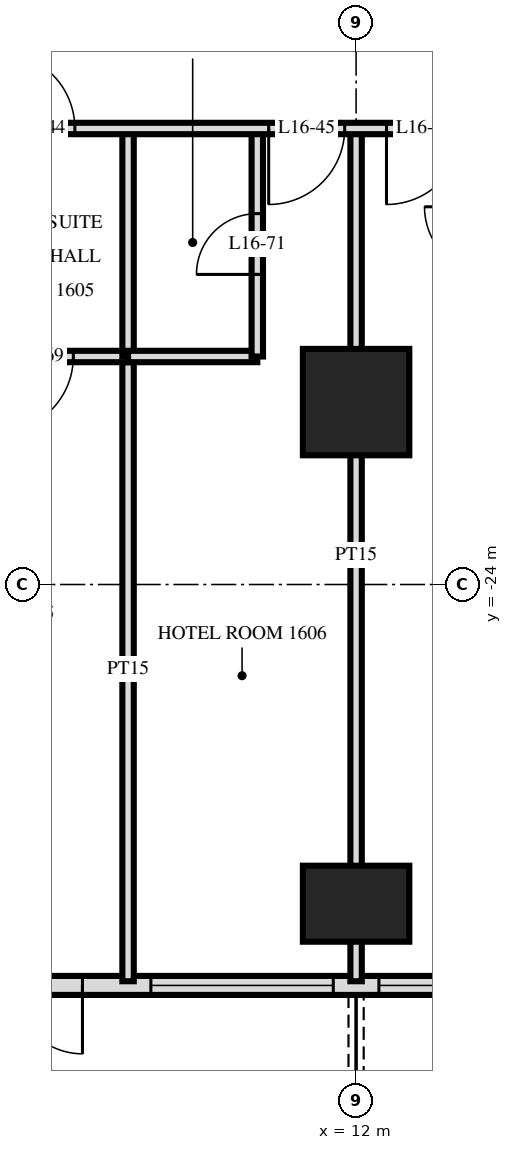
"""IFC4 building model, lengths in metres.
Left out: names, types, materials, properties, quantities, classifications, styles, units other than length and angle.
Written with IfcOpenShell. Run it as: python <this file> out.ifc"""

import sys

from ifc_helpers import new_model, si_unit, direction, frame, frame_2d, origin, origin_2d, place, context, subcontext, project, spatial, rectangle, extrude, element, fill, save


model = new_model("IFC4")
c1 = context("Model", 3, precision=1e-05, world=origin(), true_north=direction((0.0, 1.0)))
c2 = subcontext(c1, "Body", "Model", "MODEL_VIEW")
j1 = project(units=[si_unit("LENGTHUNIT", "METRE"), si_unit("PLANEANGLEUNIT", "RADIAN")], contexts=[c1])
p1 = place(None, origin())
s1 = spatial("IfcSite", under=j1, at=p1, CompositionType="ELEMENT")
p2 = place(p1, origin())
s2 = spatial("IfcBuilding", under=s1, at=p2, CompositionType="ELEMENT")
p3 = place(p2, frame((0.0, 0.0, 67.2)))
s3 = spatial("IfcBuildingStorey", under=s2, at=p3, CompositionType="ELEMENT", Elevation=67.2)
p4 = place(p3, frame((12.0, -28.2, 0.0), z_axis=(0.0, 0.0, 1.0), x_axis=(1.0, 0.0, 0.0)))
e1 = element("IfcColumn", 1, at=p4, inside=s3, PredefinedType="COLUMN", context=c2, shape_type="SweptSolid", body=[
    extrude(rectangle(XDim=1.4, YDim=1.0, at=origin_2d()), origin(), (0.0, 0.0, 1.0), 3.6),
])
p5 = place(p3, frame((12.0, -21.6, 0.0), z_axis=(0.0, 0.0, 1.0), x_axis=(1.0, 0.0, 0.0)))
e2 = element("IfcColumn", 2, at=p5, inside=s3, PredefinedType="COLUMN", context=c2, shape_type="SweptSolid", body=[
    extrude(rectangle(XDim=1.4, YDim=1.4, at=origin_2d()), origin(), (0.0, 0.0, 1.0), 3.6),
])
p6 = place(p3, frame((-28.775, -29.275, 0.0), z_axis=(0.0, 0.0, 1.0), x_axis=(1.0, 0.0, 0.0)))
e3 = element("IfcWall", 3, at=p6, inside=s3, PredefinedType="SOLIDWALL", context=c2, shape_type="SweptSolid", body=[
    extrude(rectangle(XDim=57.551, YDim=0.25, at=frame_2d((28.775, 0.0))), origin(), (0.0, 0.0, 1.0), 3.32),
])
p7 = place(p6, frame((0.575, 0.0, 0.0)))
e4 = element("IfcOpeningElement", 4, at=p7, cuts=e3, PredefinedType="OPENING", context=c2, shape_type="SweptSolid", body=[
    extrude(rectangle(XDim=1.8, YDim=2.4, at=frame_2d((0.9, 1.2))), frame((0.0, 0.135, 0.0), z_axis=(0.0, -1.0, 0.0), x_axis=(1.0, 0.0, 0.0)), (0.0, 0.0, 1.0), 0.27),
])
p8 = place(p6, frame((5.075, 0.0, 0.3)))
e5 = element("IfcOpeningElement", 5, at=p8, cuts=e3, PredefinedType="OPENING", context=c2, shape_type="SweptSolid", body=[
    extrude(rectangle(XDim=2.4, YDim=2.1, at=frame_2d((1.2, 1.05))), frame((0.0, 0.135, 0.0), z_axis=(0.0, -1.0, 0.0), x_axis=(1.0, 0.0, 0.0)), (0.0, 0.0, 1.0), 0.27),
])
p9 = place(p6, frame((8.375, 0.0, 0.0)))
e6 = element("IfcOpeningElement", 6, at=p9, cuts=e3, PredefinedType="OPENING", context=c2, shape_type="SweptSolid", body=[
    extrude(rectangle(XDim=1.8, YDim=2.4, at=frame_2d((0.9, 1.2))), frame((0.0, 0.135, 0.0), z_axis=(0.0, -1.0, 0.0), x_axis=(1.0, 0.0, 0.0)), (0.0, 0.0, 1.0), 0.27),
])
p10 = place(p6, frame((11.375, 0.0, 0.0)))
e7 = element("IfcOpeningElement", 7, at=p10, cuts=e3, PredefinedType="OPENING", context=c2, shape_type="SweptSolid", body=[
    extrude(rectangle(XDim=1.8, YDim=2.4, at=frame_2d((0.9, 1.2))), frame((0.0, 0.135, 0.0), z_axis=(0.0, -1.0, 0.0), x_axis=(1.0, 0.0, 0.0)), (0.0, 0.0, 1.0), 0.27),
])
p11 = place(p6, frame((14.075, 0.0, 0.3)))
e8 = element("IfcOpeningElement", 8, at=p11, cuts=e3, PredefinedType="OPENING", context=c2, shape_type="SweptSolid", body=[
    extrude(rectangle(XDim=2.4, YDim=2.1, at=frame_2d((1.2, 1.05))), frame((0.0, 0.135, 0.0), z_axis=(0.0, -1.0, 0.0), x_axis=(1.0, 0.0, 0.0)), (0.0, 0.0, 1.0), 0.27),
])
p12 = place(p6, frame((17.375, 0.0, 0.0)))
e9 = element("IfcOpeningElement", 9, at=p12, cuts=e3, PredefinedType="OPENING", context=c2, shape_type="SweptSolid", body=[
    extrude(rectangle(XDim=1.8, YDim=2.4, at=frame_2d((0.9, 1.2))), frame((0.0, 0.135, 0.0), z_axis=(0.0, -1.0, 0.0), x_axis=(1.0, 0.0, 0.0)), (0.0, 0.0, 1.0), 0.27),
])
p13 = place(p6, frame((20.075, 0.0, 0.3)))
e10 = element("IfcOpeningElement", 10, at=p13, cuts=e3, PredefinedType="OPENING", context=c2, shape_type="SweptSolid", body=[
    extrude(rectangle(XDim=2.4, YDim=2.1, at=frame_2d((1.2, 1.05))), frame((0.0, 0.135, 0.0), z_axis=(0.0, -1.0, 0.0), x_axis=(1.0, 0.0, 0.0)), (0.0, 0.0, 1.0), 0.27),
])
p14 = place(p6, frame((23.075, 0.0, 0.3)))
e11 = element("IfcOpeningElement", 11, at=p14, cuts=e3, PredefinedType="OPENING", context=c2, shape_type="SweptSolid", body=[
    extrude(rectangle(XDim=2.4, YDim=2.1, at=frame_2d((1.2, 1.05))), frame((0.0, 0.135, 0.0), z_axis=(0.0, -1.0, 0.0), x_axis=(1.0, 0.0, 0.0)), (0.0, 0.0, 1.0), 0.27),
])
p15 = place(p6, frame((26.375, 0.0, 0.0)))
e12 = element("IfcOpeningElement", 12, at=p15, cuts=e3, PredefinedType="OPENING", context=c2, shape_type="SweptSolid", body=[
    extrude(rectangle(XDim=1.8, YDim=2.4, at=frame_2d((0.9, 1.2))), frame((0.0, 0.135, 0.0), z_axis=(0.0, -1.0, 0.0), x_axis=(1.0, 0.0, 0.0)), (0.0, 0.0, 1.0), 0.27),
])
p16 = place(p6, frame((29.375, 0.0, 0.0)))
e13 = element("IfcOpeningElement", 13, at=p16, cuts=e3, PredefinedType="OPENING", context=c2, shape_type="SweptSolid", body=[
    extrude(rectangle(XDim=1.8, YDim=2.4, at=frame_2d((0.9, 1.2))), frame((0.0, 0.135, 0.0), z_axis=(0.0, -1.0, 0.0), x_axis=(1.0, 0.0, 0.0)), (0.0, 0.0, 1.0), 0.27),
])
p17 = place(p6, frame((32.075, 0.0, 0.3)))
e14 = element("IfcOpeningElement", 14, at=p17, cuts=e3, PredefinedType="OPENING", context=c2, shape_type="SweptSolid", body=[
    extrude(rectangle(XDim=2.4, YDim=2.1, at=frame_2d((1.2, 1.05))), frame((0.0, 0.135, 0.0), z_axis=(0.0, -1.0, 0.0), x_axis=(1.0, 0.0, 0.0)), (0.0, 0.0, 1.0), 0.27),
])
p18 = place(p6, frame((35.375, 0.0, 0.0)))
e15 = element("IfcOpeningElement", 15, at=p18, cuts=e3, PredefinedType="OPENING", context=c2, shape_type="SweptSolid", body=[
    extrude(rectangle(XDim=1.8, YDim=2.4, at=frame_2d((0.9, 1.2))), frame((0.0, 0.135, 0.0), z_axis=(0.0, -1.0, 0.0), x_axis=(1.0, 0.0, 0.0)), (0.0, 0.0, 1.0), 0.27),
])
p19 = place(p6, frame((38.075, 0.0, 0.3)))
e16 = element("IfcOpeningElement", 16, at=p19, cuts=e3, PredefinedType="OPENING", context=c2, shape_type="SweptSolid", body=[
    extrude(rectangle(XDim=2.4, YDim=2.1, at=frame_2d((1.2, 1.05))), frame((0.0, 0.135, 0.0), z_axis=(0.0, -1.0, 0.0), x_axis=(1.0, 0.0, 0.0)), (0.0, 0.0, 1.0), 0.27),
])
p20 = place(p6, frame((41.075, 0.0, 0.3)))
e17 = element("IfcOpeningElement", 17, at=p20, cuts=e3, PredefinedType="OPENING", context=c2, shape_type="SweptSolid", body=[
    extrude(rectangle(XDim=2.4, YDim=2.1, at=frame_2d((1.2, 1.05))), frame((0.0, 0.135, 0.0), z_axis=(0.0, -1.0, 0.0), x_axis=(1.0, 0.0, 0.0)), (0.0, 0.0, 1.0), 0.27),
])
p21 = place(p6, frame((44.375, 0.0, 0.0)))
e18 = element("IfcOpeningElement", 18, at=p21, cuts=e3, PredefinedType="OPENING", context=c2, shape_type="SweptSolid", body=[
    extrude(rectangle(XDim=1.8, YDim=2.4, at=frame_2d((0.9, 1.2))), frame((0.0, 0.135, 0.0), z_axis=(0.0, -1.0, 0.0), x_axis=(1.0, 0.0, 0.0)), (0.0, 0.0, 1.0), 0.27),
])
p22 = place(p6, frame((47.075, 0.0, 0.3)))
e19 = element("IfcOpeningElement", 19, at=p22, cuts=e3, PredefinedType="OPENING", context=c2, shape_type="SweptSolid", body=[
    extrude(rectangle(XDim=2.4, YDim=2.1, at=frame_2d((1.2, 1.05))), frame((0.0, 0.135, 0.0), z_axis=(0.0, -1.0, 0.0), x_axis=(1.0, 0.0, 0.0)), (0.0, 0.0, 1.0), 0.27),
])
p23 = place(p6, frame((50.375, 0.0, 0.0)))
e20 = element("IfcOpeningElement", 20, at=p23, cuts=e3, PredefinedType="OPENING", context=c2, shape_type="SweptSolid", body=[
    extrude(rectangle(XDim=1.8, YDim=2.4, at=frame_2d((0.9, 1.2))), frame((0.0, 0.135, 0.0), z_axis=(0.0, -1.0, 0.0), x_axis=(1.0, 0.0, 0.0)), (0.0, 0.0, 1.0), 0.27),
])
p24 = place(p6, frame((53.375, 0.0, 0.0)))
e21 = element("IfcOpeningElement", 21, at=p24, cuts=e3, PredefinedType="OPENING", context=c2, shape_type="SweptSolid", body=[
    extrude(rectangle(XDim=1.8, YDim=2.4, at=frame_2d((0.9, 1.2))), frame((0.0, 0.135, 0.0), z_axis=(0.0, -1.0, 0.0), x_axis=(1.0, 0.0, 0.0)), (0.0, 0.0, 1.0), 0.27),
])
p25 = place(p3, frame((12.0, -29.22, 0.0), z_axis=(0.0, 0.0, 1.0), x_axis=(0.0, 1.0, 0.0)))
e22 = element("IfcWall", 22, at=p25, inside=s3, PredefinedType="PARTITIONING", context=c2, shape_type="SweptSolid", body=[
    extrude(rectangle(XDim=11.22, YDim=0.15, at=frame_2d((5.61, 0.0))), origin(), (0.0, 0.0, 1.0), 3.32),
])
p26 = place(p3, frame((10.7, -21.0, 0.0), z_axis=(0.0, 0.0, 1.0), x_axis=(0.0, 1.0, 0.0)))
e23 = element("IfcWall", 23, at=p26, inside=s3, PredefinedType="PARTITIONING", context=c2, shape_type="SweptSolid", body=[
    extrude(rectangle(XDim=3.0, YDim=0.15, at=frame_2d((1.5, 0.0))), origin(), (0.0, 0.0, 1.0), 3.32),
])
p27 = place(p26, frame((1.08, 0.0, 0.0)))
e24 = element("IfcOpeningElement", 24, at=p27, cuts=e23, PredefinedType="OPENING", context=c2, shape_type="SweptSolid", body=[
    extrude(rectangle(XDim=0.8, YDim=2.1, at=frame_2d((0.4, 1.05))), frame((0.0, 0.085, 0.0), z_axis=(0.0, -1.0, 0.0), x_axis=(1.0, 0.0, 0.0)), (0.0, 0.0, 1.0), 0.17),
])
p28 = place(p3, frame((9.0, -21.0, 0.0), z_axis=(0.0, 0.0, 1.0), x_axis=(0.0, 1.0, 0.0)))
e25 = element("IfcWall", 25, at=p28, inside=s3, PredefinedType="PARTITIONING", context=c2, shape_type="SweptSolid", body=[
    extrude(rectangle(XDim=3.0, YDim=0.15, at=frame_2d((1.5, 0.0))), origin(), (0.0, 0.0, 1.0), 3.32),
])
p29 = place(p3, frame((9.0, -29.22, 0.0), z_axis=(0.0, 0.0, 1.0), x_axis=(0.0, 1.0, 0.0)))
e26 = element("IfcWall", 26, at=p29, inside=s3, PredefinedType="PARTITIONING", context=c2, shape_type="SweptSolid", body=[
    extrude(rectangle(XDim=8.22, YDim=0.15, at=frame_2d((4.11, 0.0))), origin(), (0.0, 0.0, 1.0), 3.32),
])
p30 = place(p3, frame((6.6, -21.0, 0.0), z_axis=(0.0, 0.0, 1.0), x_axis=(1.0, 0.0, 0.0)))
e27 = element("IfcWall", 27, at=p30, inside=s3, PredefinedType="PARTITIONING", context=c2, shape_type="SweptSolid", body=[
    extrude(rectangle(XDim=2.4, YDim=0.15, at=frame_2d((1.2, 0.0))), origin(), (0.0, 0.0, 1.0), 3.32),
])
p31 = place(p30, frame((0.68, 0.0, 0.0)))
e28 = element("IfcOpeningElement", 28, at=p31, cuts=e27, PredefinedType="OPENING", context=c2, shape_type="SweptSolid", body=[
    extrude(rectangle(XDim=1.0, YDim=2.1, at=frame_2d((0.5, 1.05))), frame((0.0, 0.085, 0.0), z_axis=(0.0, -1.0, 0.0), x_axis=(1.0, 0.0, 0.0)), (0.0, 0.0, 1.0), 0.17),
])
p32 = place(p3, frame((9.0, -21.0, 0.0), z_axis=(0.0, 0.0, 1.0), x_axis=(1.0, 0.0, 0.0)))
e29 = element("IfcWall", 29, at=p32, inside=s3, PredefinedType="PARTITIONING", context=c2, shape_type="SweptSolid", body=[
    extrude(rectangle(XDim=1.7, YDim=0.15, at=frame_2d((0.85, 0.0))), origin(), (0.0, 0.0, 1.0), 3.32),
])
p33 = place(p3, frame((-33.12, -18.0, 0.0), z_axis=(0.0, 0.0, 1.0), x_axis=(1.0, 0.0, 0.0)))
e30 = element("IfcWall", 30, at=p33, inside=s3, PredefinedType="PARTITIONING", context=c2, shape_type="SweptSolid", body=[
    extrude(rectangle(XDim=66.24, YDim=0.15, at=frame_2d((33.12, 0.0))), origin(), (0.0, 0.0, 1.0), 3.32),
])
p34 = place(p33, frame((15.27, 0.0, 0.0)))
e31 = element("IfcOpeningElement", 31, at=p34, cuts=e30, PredefinedType="OPENING", context=c2, shape_type="SweptSolid", body=[
    extrude(rectangle(XDim=1.0, YDim=2.1, at=frame_2d((0.5, 1.05))), frame((0.0, 0.085, 0.0), z_axis=(0.0, -1.0, 0.0), x_axis=(1.0, 0.0, 0.0)), (0.0, 0.0, 1.0), 0.17),
])
p35 = place(p33, frame((21.22, 0.0, 0.0)))
e32 = element("IfcOpeningElement", 32, at=p35, cuts=e30, PredefinedType="OPENING", context=c2, shape_type="SweptSolid", body=[
    extrude(rectangle(XDim=1.0, YDim=2.1, at=frame_2d((0.5, 1.05))), frame((0.0, 0.085, 0.0), z_axis=(0.0, -1.0, 0.0), x_axis=(1.0, 0.0, 0.0)), (0.0, 0.0, 1.0), 0.17),
])
p36 = place(p33, frame((24.27, 0.0, 0.0)))
e33 = element("IfcOpeningElement", 33, at=p36, cuts=e30, PredefinedType="OPENING", context=c2, shape_type="SweptSolid", body=[
    extrude(rectangle(XDim=1.0, YDim=2.1, at=frame_2d((0.5, 1.05))), frame((0.0, 0.085, 0.0), z_axis=(0.0, -1.0, 0.0), x_axis=(1.0, 0.0, 0.0)), (0.0, 0.0, 1.0), 0.17),
])
p37 = place(p33, frame((30.97, 0.0, 0.0)))
e34 = element("IfcOpeningElement", 34, at=p37, cuts=e30, PredefinedType="OPENING", context=c2, shape_type="SweptSolid", body=[
    extrude(rectangle(XDim=1.0, YDim=2.1, at=frame_2d((0.5, 1.05))), frame((0.0, 0.085, 0.0), z_axis=(0.0, -1.0, 0.0), x_axis=(1.0, 0.0, 0.0)), (0.0, 0.0, 1.0), 0.17),
])
p38 = place(p33, frame((40.42, 0.0, 0.0)))
e35 = element("IfcOpeningElement", 35, at=p38, cuts=e30, PredefinedType="OPENING", context=c2, shape_type="SweptSolid", body=[
    extrude(rectangle(XDim=1.0, YDim=2.1, at=frame_2d((0.5, 1.05))), frame((0.0, 0.085, 0.0), z_axis=(0.0, -1.0, 0.0), x_axis=(1.0, 0.0, 0.0)), (0.0, 0.0, 1.0), 0.17),
])
p39 = place(p33, frame((43.97, 0.0, 0.0)))
e36 = element("IfcOpeningElement", 36, at=p39, cuts=e30, PredefinedType="OPENING", context=c2, shape_type="SweptSolid", body=[
    extrude(rectangle(XDim=1.0, YDim=2.1, at=frame_2d((0.5, 1.05))), frame((0.0, 0.085, 0.0), z_axis=(0.0, -1.0, 0.0), x_axis=(1.0, 0.0, 0.0)), (0.0, 0.0, 1.0), 0.17),
])
p40 = place(p33, frame((45.52, 0.0, 0.0)))
e37 = element("IfcOpeningElement", 37, at=p40, cuts=e30, PredefinedType="OPENING", context=c2, shape_type="SweptSolid", body=[
    extrude(rectangle(XDim=1.0, YDim=2.1, at=frame_2d((0.5, 1.05))), frame((0.0, 0.085, 0.0), z_axis=(0.0, -1.0, 0.0), x_axis=(1.0, 0.0, 0.0)), (0.0, 0.0, 1.0), 0.17),
])
p41 = place(p33, frame((52.97, 0.0, 0.0)))
e38 = element("IfcOpeningElement", 38, at=p41, cuts=e30, PredefinedType="OPENING", context=c2, shape_type="SweptSolid", body=[
    extrude(rectangle(XDim=1.0, YDim=2.1, at=frame_2d((0.5, 1.05))), frame((0.0, 0.085, 0.0), z_axis=(0.0, -1.0, 0.0), x_axis=(1.0, 0.0, 0.0)), (0.0, 0.0, 1.0), 0.17),
])
p42 = place(p33, frame((54.27, 0.0, 0.0)))
e39 = element("IfcOpeningElement", 39, at=p42, cuts=e30, PredefinedType="OPENING", context=c2, shape_type="SweptSolid", body=[
    extrude(rectangle(XDim=1.0, YDim=2.1, at=frame_2d((0.5, 1.05))), frame((0.0, 0.085, 0.0), z_axis=(0.0, -1.0, 0.0), x_axis=(1.0, 0.0, 0.0)), (0.0, 0.0, 1.0), 0.17),
])
p43 = place(p33, frame((13.42, 0.0, 0.0)))
e40 = element("IfcOpeningElement", 40, at=p43, cuts=e30, PredefinedType="OPENING", context=c2, shape_type="SweptSolid", body=[
    extrude(rectangle(XDim=1.0, YDim=2.1, at=frame_2d((0.5, 1.05))), frame((0.0, 0.085, 0.0), z_axis=(0.0, -1.0, 0.0), x_axis=(1.0, 0.0, 0.0)), (0.0, 0.0, 1.0), 0.17),
])
p44 = place(p33, frame((60.82, 0.0, 0.0)))
e41 = element("IfcOpeningElement", 41, at=p44, cuts=e30, PredefinedType="OPENING", context=c2, shape_type="SweptSolid", body=[
    extrude(rectangle(XDim=1.0, YDim=2.1, at=frame_2d((0.5, 1.05))), frame((0.0, 0.085, 0.0), z_axis=(0.0, -1.0, 0.0), x_axis=(1.0, 0.0, 0.0)), (0.0, 0.0, 1.0), 0.17),
])
p45 = place(p18, frame((0.9, 0.0, 0.0), z_axis=(0.0, 0.0, 1.0), x_axis=(-1.0, 0.0, 0.0)))
e42 = element("IfcDoor", 42, at=p45, inside=s3, OperationType="DOUBLE_DOOR_SINGLE_SWING", PredefinedType="DOOR", context=c2, shape_type="SweptSolid", body=[
    extrude(rectangle(XDim=1.8, YDim=2.4, at=frame_2d((0.0, 1.2))), frame((0.0, -0.025, 0.0), z_axis=(0.0, 1.0, 0.0), x_axis=(-1.0, 0.0, 0.0)), (0.0, 0.0, 1.0), 0.05),
])
fill(e15, e42)
p46 = place(p19, origin())
e43 = element("IfcWindow", 43, at=p46, inside=s3, PartitioningType="SINGLE_PANEL", PredefinedType="WINDOW", context=c2, shape_type="SweptSolid", body=[
    extrude(rectangle(XDim=2.4, YDim=2.1, at=frame_2d((1.2, 1.05))), frame((0.0, 0.03, 0.0), z_axis=(0.0, -1.0, 0.0), x_axis=(1.0, 0.0, 0.0)), (0.0, 0.0, 1.0), 0.06),
])
fill(e16, e43)
p47 = place(p20, origin())
e44 = element("IfcWindow", 44, at=p47, inside=s3, PartitioningType="SINGLE_PANEL", PredefinedType="WINDOW", context=c2, shape_type="SweptSolid", body=[
    extrude(rectangle(XDim=2.4, YDim=2.1, at=frame_2d((1.2, 1.05))), frame((0.0, 0.03, 0.0), z_axis=(0.0, -1.0, 0.0), x_axis=(1.0, 0.0, 0.0)), (0.0, 0.0, 1.0), 0.06),
])
fill(e17, e44)
p48 = place(p38, origin())
e45 = element("IfcDoor", 45, at=p48, inside=s3, OperationType="SINGLE_SWING_RIGHT", PredefinedType="DOOR", context=c2, shape_type="SweptSolid", body=[
    extrude(rectangle(XDim=1.0, YDim=2.1, at=frame_2d((0.5, 1.05))), frame((0.0, 0.025, 0.0), z_axis=(0.0, -1.0, 0.0), x_axis=(1.0, 0.0, 0.0)), (0.0, 0.0, 1.0), 0.05),
])
fill(e35, e45)
p49 = place(p39, frame((0.5, 0.0, 0.0), z_axis=(0.0, 0.0, 1.0), x_axis=(-1.0, 0.0, 0.0)))
e46 = element("IfcDoor", 46, at=p49, inside=s3, OperationType="SINGLE_SWING_LEFT", PredefinedType="DOOR", context=c2, shape_type="SweptSolid", body=[
    extrude(rectangle(XDim=1.0, YDim=2.1, at=frame_2d((0.0, 1.05))), frame((0.0, -0.025, 0.0), z_axis=(0.0, 1.0, 0.0), x_axis=(-1.0, 0.0, 0.0)), (0.0, 0.0, 1.0), 0.05),
])
fill(e36, e46)
p50 = place(p40, frame((0.5, 0.0, 0.0), z_axis=(0.0, 0.0, 1.0), x_axis=(-1.0, 0.0, 0.0)))
e47 = element("IfcDoor", 47, at=p50, inside=s3, OperationType="SINGLE_SWING_LEFT", PredefinedType="DOOR", context=c2, shape_type="SweptSolid", body=[
    extrude(rectangle(XDim=1.0, YDim=2.1, at=frame_2d((0.0, 1.05))), frame((0.0, -0.025, 0.0), z_axis=(0.0, 1.0, 0.0), x_axis=(-1.0, 0.0, 0.0)), (0.0, 0.0, 1.0), 0.05),
])
fill(e37, e47)
p51 = place(p31, frame((0.5, 0.0, 0.0), z_axis=(0.0, 0.0, 1.0), x_axis=(-1.0, 0.0, 0.0)))
e48 = element("IfcDoor", 48, at=p51, inside=s3, OperationType="SINGLE_SWING_LEFT", PredefinedType="DOOR", context=c2, shape_type="SweptSolid", body=[
    extrude(rectangle(XDim=1.0, YDim=2.1, at=frame_2d((0.0, 1.05))), frame((0.0, -0.025, 0.0), z_axis=(0.0, 1.0, 0.0), x_axis=(-1.0, 0.0, 0.0)), (0.0, 0.0, 1.0), 0.05),
])
fill(e28, e48)
p52 = place(p27, origin())
e49 = element("IfcDoor", 49, at=p52, inside=s3, OperationType="SINGLE_SWING_RIGHT", PredefinedType="DOOR", context=c2, shape_type="SweptSolid", body=[
    extrude(rectangle(XDim=0.8, YDim=2.1, at=frame_2d((0.4, 1.05))), frame((0.0, 0.025, 0.0), z_axis=(0.0, -1.0, 0.0), x_axis=(1.0, 0.0, 0.0)), (0.0, 0.0, 1.0), 0.05),
])
fill(e24, e49)
save(model, sys.argv[1])
